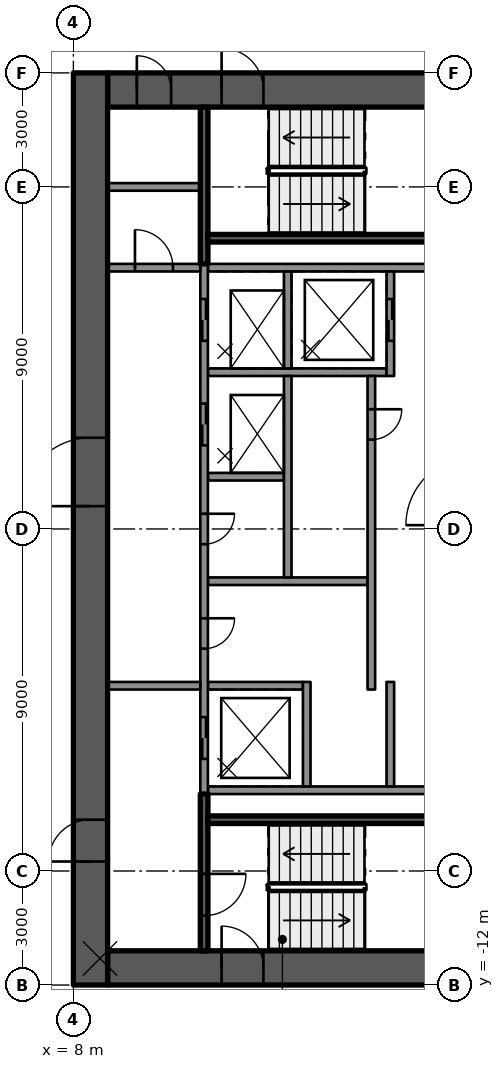
"""IFC4 building model, lengths in metres.
Left out: names, types, materials, properties, quantities, classifications, styles, units other than length and angle.
Written with IfcOpenShell. Run it as: python <this file> out.ifc"""

import sys

from ifc_helpers import new_model, si_unit, direction, frame, frame_2d, origin, place, context, subcontext, project, spatial, rectangle, extrude, element, fill, save


model = new_model("IFC4")
c1 = context("Model", 3, precision=1e-05, world=origin(), true_north=direction((0.0, 1.0)))
c2 = subcontext(c1, "Body", "Model", "MODEL_VIEW")
j1 = project(units=[si_unit("LENGTHUNIT", "METRE"), si_unit("PLANEANGLEUNIT", "RADIAN")], contexts=[c1])
p1 = place(None, origin())
s1 = spatial("IfcSite", under=j1, at=p1, CompositionType="ELEMENT")
p2 = place(p1, origin())
s2 = spatial("IfcBuilding", under=s1, at=p2, CompositionType="ELEMENT")
p3 = place(p2, frame((0.0, 0.0, 246.0)))
s3 = spatial("IfcBuildingStorey", under=s2, at=p3, CompositionType="ELEMENT", Elevation=246.0)
p4 = place(p3, frame((8.9, 11.55, 0.0), z_axis=(0.0, 0.0, 1.0), x_axis=(1.0, 0.0, 0.0)))
e1 = element("IfcWall", 1, at=p4, inside=s3, PredefinedType="SHEAR", context=c2, shape_type="SweptSolid", body=[
    extrude(rectangle(XDim=9.2, YDim=0.9, at=frame_2d((4.6, 0.0))), origin(), (0.0, 0.0, 1.0), 3.5),
])
p5 = place(p4, frame((3.0, 0.0, 0.0)))
e2 = element("IfcOpeningElement", 2, at=p5, cuts=e1, PredefinedType="OPENING", context=c2, shape_type="SweptSolid", body=[
    extrude(rectangle(XDim=1.1, YDim=2.1, at=frame_2d((0.55, 1.05))), frame((0.0, 0.46, 0.0), z_axis=(0.0, -1.0, 0.0), x_axis=(1.0, 0.0, 0.0)), (0.0, 0.0, 1.0), 0.92),
])
p6 = place(p4, frame((0.77, 0.0, 0.0)))
e3 = element("IfcOpeningElement", 3, at=p6, cuts=e1, PredefinedType="OPENING", context=c2, shape_type="SweptSolid", body=[
    extrude(rectangle(XDim=0.9, YDim=2.1, at=frame_2d((0.45, 1.05))), frame((0.0, 0.46, 0.0), z_axis=(0.0, -1.0, 0.0), x_axis=(1.0, 0.0, 0.0)), (0.0, 0.0, 1.0), 0.92),
])
p7 = place(p3, frame((8.9, -11.55, 0.0), z_axis=(0.0, 0.0, 1.0), x_axis=(1.0, 0.0, 0.0)))
e4 = element("IfcWall", 4, at=p7, inside=s3, PredefinedType="SHEAR", context=c2, shape_type="SweptSolid", body=[
    extrude(rectangle(XDim=9.2, YDim=0.9, at=frame_2d((4.6, 0.0))), origin(), (0.0, 0.0, 1.0), 3.5),
])
p8 = place(p7, frame((3.0, 0.0, 0.0)))
e5 = element("IfcOpeningElement", 5, at=p8, cuts=e4, PredefinedType="OPENING", context=c2, shape_type="SweptSolid", body=[
    extrude(rectangle(XDim=1.1, YDim=2.1, at=frame_2d((0.55, 1.05))), frame((0.0, 0.46, 0.0), z_axis=(0.0, -1.0, 0.0), x_axis=(1.0, 0.0, 0.0)), (0.0, 0.0, 1.0), 0.92),
])
p9 = place(p3, frame((8.45, -12.0, 0.0), z_axis=(0.0, 0.0, 1.0), x_axis=(0.0, 1.0, 0.0)))
e6 = element("IfcWall", 6, at=p9, inside=s3, PredefinedType="SHEAR", context=c2, shape_type="SweptSolid", body=[
    extrude(rectangle(XDim=24.0, YDim=0.9, at=frame_2d((12.0, 0.0))), origin(), (0.0, 0.0, 1.0), 3.5),
])
p10 = place(p9, frame((12.6, 0.0, 0.0)))
e7 = element("IfcOpeningElement", 7, at=p10, cuts=e6, PredefinedType="OPENING", context=c2, shape_type="SweptSolid", body=[
    extrude(rectangle(XDim=1.8, YDim=2.1, at=frame_2d((0.9, 1.05))), frame((0.0, 0.46, 0.0), z_axis=(0.0, -1.0, 0.0), x_axis=(1.0, 0.0, 0.0)), (0.0, 0.0, 1.0), 0.92),
])
p11 = place(p9, frame((3.25, 0.0, 0.0)))
e8 = element("IfcOpeningElement", 8, at=p11, cuts=e6, PredefinedType="OPENING", context=c2, shape_type="SweptSolid", body=[
    extrude(rectangle(XDim=1.1, YDim=2.1, at=frame_2d((0.55, 1.05))), frame((0.0, 0.46, 0.0), z_axis=(0.0, -1.0, 0.0), x_axis=(1.0, 0.0, 0.0)), (0.0, 0.0, 1.0), 0.92),
])
for number, where, z_axis, x_axis in (
    (9, (11.54, -6.875, 0.0), (0.0, 0.0, 1.0), (1.0, 0.0, 0.0)),
    (10, (11.54, 6.875, 0.0), (0.0, 0.0, 1.0), (1.0, 0.0, 0.0)),
):
    element("IfcWall", number, at=place(p3, frame(where, z_axis=z_axis, x_axis=x_axis)), inside=s3, PredefinedType="SOLIDWALL", context=c2, shape_type="SweptSolid", body=[
        extrude(rectangle(XDim=6.56, YDim=0.2, at=frame_2d((3.28, 0.0))), origin(), (0.0, 0.0, 1.0), 3.08),
    ])
p12 = place(p3, frame((11.54, 4.125, 0.0), z_axis=(0.0, 0.0, 1.0), x_axis=(1.0, 0.0, 0.0)))
e11 = element("IfcWall", 11, at=p12, inside=s3, PredefinedType="SOLIDWALL", context=c2, shape_type="SweptSolid", body=[
    extrude(rectangle(XDim=4.7, YDim=0.2, at=frame_2d((2.35, 0.0))), origin(), (0.0, 0.0, 1.0), 3.08),
])
p13 = place(p3, frame((11.54, 1.375, 0.0), z_axis=(0.0, 0.0, 1.0), x_axis=(1.0, 0.0, 0.0)))
e12 = element("IfcWall", 12, at=p13, inside=s3, PredefinedType="SOLIDWALL", context=c2, shape_type="SweptSolid", body=[
    extrude(rectangle(XDim=2.0, YDim=0.2, at=frame_2d((1.0, 0.0))), origin(), (0.0, 0.0, 1.0), 3.08),
])
p14 = place(p3, frame((11.54, -1.375, 0.0), z_axis=(0.0, 0.0, 1.0), x_axis=(1.0, 0.0, 0.0)))
e13 = element("IfcWall", 13, at=p14, inside=s3, PredefinedType="SOLIDWALL", context=c2, shape_type="SweptSolid", body=[
    extrude(rectangle(XDim=4.2, YDim=0.2, at=frame_2d((2.1, 0.0))), origin(), (0.0, 0.0, 1.0), 3.08),
])
p15 = place(p3, frame((11.54, -4.125, 0.0), z_axis=(0.0, 0.0, 1.0), x_axis=(1.0, 0.0, 0.0)))
e14 = element("IfcWall", 14, at=p15, inside=s3, PredefinedType="SOLIDWALL", context=c2, shape_type="SweptSolid", body=[
    extrude(rectangle(XDim=2.5, YDim=0.2, at=frame_2d((1.25, 0.0))), origin(), (0.0, 0.0, 1.0), 3.08),
])
p16 = place(p3, frame((11.44, 6.975, 0.0), z_axis=(0.0, 0.0, 1.0), x_axis=(0.0, -1.0, 0.0)))
e15 = element("IfcWall", 15, at=p16, inside=s3, PredefinedType="SOLIDWALL", context=c2, shape_type="SweptSolid", body=[
    extrude(rectangle(XDim=13.95, YDim=0.2, at=frame_2d((6.975, 0.0))), origin(), (0.0, 0.0, 1.0), 3.08),
])
p17 = place(p16, frame((0.925, 0.0, 0.0)))
e16 = element("IfcOpeningElement", 16, at=p17, cuts=e15, PredefinedType="OPENING", context=c2, shape_type="SweptSolid", body=[
    extrude(rectangle(XDim=1.1, YDim=2.1, at=frame_2d((0.55, 1.05))), frame((0.0, 0.11, 0.0), z_axis=(0.0, -1.0, 0.0), x_axis=(1.0, 0.0, 0.0)), (0.0, 0.0, 1.0), 0.22),
])
p18 = place(p16, frame((3.675, 0.0, 0.0)))
e17 = element("IfcOpeningElement", 17, at=p18, cuts=e15, PredefinedType="OPENING", context=c2, shape_type="SweptSolid", body=[
    extrude(rectangle(XDim=1.1, YDim=2.1, at=frame_2d((0.55, 1.05))), frame((0.0, 0.11, 0.0), z_axis=(0.0, -1.0, 0.0), x_axis=(1.0, 0.0, 0.0)), (0.0, 0.0, 1.0), 0.22),
])
p19 = place(p16, frame((11.925, 0.0, 0.0)))
e18 = element("IfcOpeningElement", 18, at=p19, cuts=e15, PredefinedType="OPENING", context=c2, shape_type="SweptSolid", body=[
    extrude(rectangle(XDim=1.1, YDim=2.1, at=frame_2d((0.55, 1.05))), frame((0.0, 0.11, 0.0), z_axis=(0.0, -1.0, 0.0), x_axis=(1.0, 0.0, 0.0)), (0.0, 0.0, 1.0), 0.22),
])
p20 = place(p16, frame((6.575, 0.0, 0.0)))
e19 = element("IfcOpeningElement", 19, at=p20, cuts=e15, PredefinedType="OPENING", context=c2, shape_type="SweptSolid", body=[
    extrude(rectangle(XDim=0.8, YDim=2.1, at=frame_2d((0.4, 1.05))), frame((0.0, 0.11, 0.0), z_axis=(0.0, -1.0, 0.0), x_axis=(1.0, 0.0, 0.0)), (0.0, 0.0, 1.0), 0.22),
])
p21 = place(p16, frame((9.325, 0.0, 0.0)))
e20 = element("IfcOpeningElement", 20, at=p21, cuts=e15, PredefinedType="OPENING", context=c2, shape_type="SweptSolid", body=[
    extrude(rectangle(XDim=0.8, YDim=2.1, at=frame_2d((0.4, 1.05))), frame((0.0, 0.11, 0.0), z_axis=(0.0, -1.0, 0.0), x_axis=(1.0, 0.0, 0.0)), (0.0, 0.0, 1.0), 0.22),
])
p22 = place(p3, frame((13.64, 6.775, 0.0), z_axis=(0.0, 0.0, 1.0), x_axis=(0.0, -1.0, 0.0)))
e21 = element("IfcWall", 21, at=p22, inside=s3, PredefinedType="SOLIDWALL", context=c2, shape_type="SweptSolid", body=[
    extrude(rectangle(XDim=2.55, YDim=0.2, at=frame_2d((1.275, 0.0))), origin(), (0.0, 0.0, 1.0), 3.08),
])
p23 = place(p3, frame((13.64, 4.025, 0.0), z_axis=(0.0, 0.0, 1.0), x_axis=(0.0, -1.0, 0.0)))
e22 = element("IfcWall", 22, at=p23, inside=s3, PredefinedType="SOLIDWALL", context=c2, shape_type="SweptSolid", body=[
    extrude(rectangle(XDim=5.3, YDim=0.2, at=frame_2d((2.65, 0.0))), origin(), (0.0, 0.0, 1.0), 3.08),
])
p24 = place(p3, frame((14.14, -4.025, 0.0), z_axis=(0.0, 0.0, 1.0), x_axis=(0.0, -1.0, 0.0)))
e23 = element("IfcWall", 23, at=p24, inside=s3, PredefinedType="SOLIDWALL", context=c2, shape_type="SweptSolid", body=[
    extrude(rectangle(XDim=2.75, YDim=0.2, at=frame_2d((1.375, 0.0))), origin(), (0.0, 0.0, 1.0), 3.08),
])
p25 = place(p3, frame((16.34, 6.775, 0.0), z_axis=(0.0, 0.0, 1.0), x_axis=(0.0, -1.0, 0.0)))
e24 = element("IfcWall", 24, at=p25, inside=s3, PredefinedType="SOLIDWALL", context=c2, shape_type="SweptSolid", body=[
    extrude(rectangle(XDim=2.75, YDim=0.2, at=frame_2d((1.375, 0.0))), origin(), (0.0, 0.0, 1.0), 3.08),
])
p26 = place(p25, frame((0.725, 0.0, 0.0)))
e25 = element("IfcOpeningElement", 25, at=p26, cuts=e24, PredefinedType="OPENING", context=c2, shape_type="SweptSolid", body=[
    extrude(rectangle(XDim=1.1, YDim=2.1, at=frame_2d((0.55, 1.05))), frame((0.0, 0.11, 0.0), z_axis=(0.0, -1.0, 0.0), x_axis=(1.0, 0.0, 0.0)), (0.0, 0.0, 1.0), 0.22),
])
p27 = place(p3, frame((15.84, 4.025, 0.0), z_axis=(0.0, 0.0, 1.0), x_axis=(0.0, -1.0, 0.0)))
e26 = element("IfcWall", 26, at=p27, inside=s3, PredefinedType="SOLIDWALL", context=c2, shape_type="SweptSolid", body=[
    extrude(rectangle(XDim=8.25, YDim=0.2, at=frame_2d((4.125, 0.0))), origin(), (0.0, 0.0, 1.0), 3.08),
])
p28 = place(p27, frame((0.875, 0.0, 0.0)))
e27 = element("IfcOpeningElement", 27, at=p28, cuts=e26, PredefinedType="OPENING", context=c2, shape_type="SweptSolid", body=[
    extrude(rectangle(XDim=0.8, YDim=2.1, at=frame_2d((0.4, 1.05))), frame((0.0, 0.11, 0.0), z_axis=(0.0, -1.0, 0.0), x_axis=(1.0, 0.0, 0.0)), (0.0, 0.0, 1.0), 0.22),
])
p29 = place(p3, frame((16.34, -4.025, 0.0), z_axis=(0.0, 0.0, 1.0), x_axis=(0.0, -1.0, 0.0)))
e28 = element("IfcWall", 28, at=p29, inside=s3, PredefinedType="SOLIDWALL", context=c2, shape_type="SweptSolid", body=[
    extrude(rectangle(XDim=2.75, YDim=0.2, at=frame_2d((1.375, 0.0))), origin(), (0.0, 0.0, 1.0), 3.08),
])
p30 = place(p3, frame((11.44, -6.975, 0.0), z_axis=(0.0, 0.0, 1.0), x_axis=(0.0, -1.0, 0.0)))
e29 = element("IfcWall", 29, at=p30, inside=s3, PredefinedType="SOLIDWALL", context=c2, shape_type="SweptSolid", body=[
    extrude(rectangle(XDim=4.125, YDim=0.2, at=frame_2d((2.062, 0.0))), origin(), (0.0, 0.0, 1.0), 3.08),
])
p31 = place(p30, frame((2.1, 0.0, 0.0)))
e30 = element("IfcOpeningElement", 30, at=p31, cuts=e29, PredefinedType="OPENING", context=c2, shape_type="SweptSolid", body=[
    extrude(rectangle(XDim=1.1, YDim=2.1, at=frame_2d((0.55, 1.05))), frame((0.0, 0.11, 0.0), z_axis=(0.0, -1.0, 0.0), x_axis=(1.0, 0.0, 0.0)), (0.0, 0.0, 1.0), 0.22),
])
p32 = place(p3, frame((11.54, -7.65, 0.0), z_axis=(0.0, 0.0, 1.0), x_axis=(1.0, 0.0, 0.0)))
e31 = element("IfcWall", 31, at=p32, inside=s3, PredefinedType="SOLIDWALL", context=c2, shape_type="SweptSolid", body=[
    extrude(rectangle(XDim=6.56, YDim=0.2, at=frame_2d((3.28, 0.0))), origin(), (0.0, 0.0, 1.0), 3.08),
])
p33 = place(p3, frame((11.44, 11.1, 0.0), z_axis=(0.0, 0.0, 1.0), x_axis=(0.0, -1.0, 0.0)))
e32 = element("IfcWall", 32, at=p33, inside=s3, PredefinedType="SOLIDWALL", context=c2, shape_type="SweptSolid", body=[
    extrude(rectangle(XDim=4.125, YDim=0.2, at=frame_2d((2.062, 0.0))), origin(), (0.0, 0.0, 1.0), 3.08),
])
p34 = place(p3, frame((11.54, 7.65, 0.0), z_axis=(0.0, 0.0, 1.0), x_axis=(1.0, 0.0, 0.0)))
e33 = element("IfcWall", 33, at=p34, inside=s3, PredefinedType="SOLIDWALL", context=c2, shape_type="SweptSolid", body=[
    extrude(rectangle(XDim=6.56, YDim=0.2, at=frame_2d((3.28, 0.0))), origin(), (0.0, 0.0, 1.0), 3.08),
])
p35 = place(p3, frame((8.9, -4.125, 0.0), z_axis=(0.0, 0.0, 1.0), x_axis=(1.0, 0.0, 0.0)))
e34 = element("IfcWall", 34, at=p35, inside=s3, PredefinedType="PARTITIONING", context=c2, shape_type="SweptSolid", body=[
    extrude(rectangle(XDim=2.44, YDim=0.2, at=frame_2d((1.22, 0.0))), origin(), (0.0, 0.0, 1.0), 3.08),
])
p36 = place(p3, frame((8.9, 6.875, 0.0), z_axis=(0.0, 0.0, 1.0), x_axis=(1.0, 0.0, 0.0)))
e35 = element("IfcWall", 35, at=p36, inside=s3, PredefinedType="PARTITIONING", context=c2, shape_type="SweptSolid", body=[
    extrude(rectangle(XDim=2.44, YDim=0.2, at=frame_2d((1.22, 0.0))), origin(), (0.0, 0.0, 1.0), 3.08),
])
p37 = place(p36, frame((0.72, 0.0, 0.0)))
e36 = element("IfcOpeningElement", 36, at=p37, cuts=e35, PredefinedType="OPENING", context=c2, shape_type="SweptSolid", body=[
    extrude(rectangle(XDim=1.0, YDim=2.1, at=frame_2d((0.5, 1.05))), frame((0.0, 0.11, 0.0), z_axis=(0.0, -1.0, 0.0), x_axis=(1.0, 0.0, 0.0)), (0.0, 0.0, 1.0), 0.22),
])
p38 = place(p3, frame((8.9, 9.0, 0.0), z_axis=(0.0, 0.0, 1.0), x_axis=(1.0, 0.0, 0.0)))
e37 = element("IfcWall", 37, at=p38, inside=s3, PredefinedType="PARTITIONING", context=c2, shape_type="SweptSolid", body=[
    extrude(rectangle(XDim=2.44, YDim=0.2, at=frame_2d((1.22, 0.0))), origin(), (0.0, 0.0, 1.0), 3.08),
])
p39 = place(p17, origin())
e38 = element("IfcDoor", 38, at=p39, inside=s3, OperationType="DOUBLE_DOOR_SLIDING", PredefinedType="DOOR", context=c2, shape_type="SweptSolid", body=[
    extrude(rectangle(XDim=1.1, YDim=2.1, at=frame_2d((0.55, 1.05))), frame((0.0, 0.025, 0.0), z_axis=(0.0, -1.0, 0.0), x_axis=(1.0, 0.0, 0.0)), (0.0, 0.0, 1.0), 0.05),
])
fill(e16, e38)
p40 = place(p26, origin())
e39 = element("IfcDoor", 39, at=p40, inside=s3, OperationType="DOUBLE_DOOR_SLIDING", PredefinedType="DOOR", context=c2, shape_type="SweptSolid", body=[
    extrude(rectangle(XDim=1.1, YDim=2.1, at=frame_2d((0.55, 1.05))), frame((0.0, 0.025, 0.0), z_axis=(0.0, -1.0, 0.0), x_axis=(1.0, 0.0, 0.0)), (0.0, 0.0, 1.0), 0.05),
])
fill(e25, e39)
p41 = place(p18, origin())
e40 = element("IfcDoor", 40, at=p41, inside=s3, OperationType="DOUBLE_DOOR_SLIDING", PredefinedType="DOOR", context=c2, shape_type="SweptSolid", body=[
    extrude(rectangle(XDim=1.1, YDim=2.1, at=frame_2d((0.55, 1.05))), frame((0.0, 0.025, 0.0), z_axis=(0.0, -1.0, 0.0), x_axis=(1.0, 0.0, 0.0)), (0.0, 0.0, 1.0), 0.05),
])
fill(e17, e40)
p42 = place(p19, origin())
e41 = element("IfcDoor", 41, at=p42, inside=s3, OperationType="DOUBLE_DOOR_SLIDING", PredefinedType="DOOR", context=c2, shape_type="SweptSolid", body=[
    extrude(rectangle(XDim=1.1, YDim=2.1, at=frame_2d((0.55, 1.05))), frame((0.0, 0.025, 0.0), z_axis=(0.0, -1.0, 0.0), x_axis=(1.0, 0.0, 0.0)), (0.0, 0.0, 1.0), 0.05),
])
fill(e18, e41)
p43 = place(p28, origin())
e42 = element("IfcDoor", 42, at=p43, inside=s3, OperationType="SINGLE_SWING_LEFT", PredefinedType="DOOR", context=c2, shape_type="SweptSolid", body=[
    extrude(rectangle(XDim=0.8, YDim=2.1, at=frame_2d((0.4, 1.05))), frame((0.0, 0.025, 0.0), z_axis=(0.0, -1.0, 0.0), x_axis=(1.0, 0.0, 0.0)), (0.0, 0.0, 1.0), 0.05),
])
fill(e27, e42)
p44 = place(p20, origin())
e43 = element("IfcDoor", 43, at=p44, inside=s3, OperationType="SINGLE_SWING_LEFT", PredefinedType="DOOR", context=c2, shape_type="SweptSolid", body=[
    extrude(rectangle(XDim=0.8, YDim=2.1, at=frame_2d((0.4, 1.05))), frame((0.0, 0.025, 0.0), z_axis=(0.0, -1.0, 0.0), x_axis=(1.0, 0.0, 0.0)), (0.0, 0.0, 1.0), 0.05),
])
fill(e19, e43)
p45 = place(p21, origin())
e44 = element("IfcDoor", 44, at=p45, inside=s3, OperationType="SINGLE_SWING_LEFT", PredefinedType="DOOR", context=c2, shape_type="SweptSolid", body=[
    extrude(rectangle(XDim=0.8, YDim=2.1, at=frame_2d((0.4, 1.05))), frame((0.0, 0.025, 0.0), z_axis=(0.0, -1.0, 0.0), x_axis=(1.0, 0.0, 0.0)), (0.0, 0.0, 1.0), 0.05),
])
fill(e20, e44)
p46 = place(p10, origin())
e45 = element("IfcDoor", 45, at=p46, inside=s3, OperationType="SINGLE_SWING_RIGHT", PredefinedType="DOOR", context=c2, shape_type="SweptSolid", body=[
    extrude(rectangle(XDim=1.8, YDim=2.1, at=frame_2d((0.9, 1.05))), frame((0.0, 0.025, 0.0), z_axis=(0.0, -1.0, 0.0), x_axis=(1.0, 0.0, 0.0)), (0.0, 0.0, 1.0), 0.05),
])
fill(e7, e45)
p47 = place(p11, origin())
e46 = element("IfcDoor", 46, at=p47, inside=s3, OperationType="SINGLE_SWING_LEFT", PredefinedType="DOOR", context=c2, shape_type="SweptSolid", body=[
    extrude(rectangle(XDim=1.1, YDim=2.1, at=frame_2d((0.55, 1.05))), frame((0.0, 0.025, 0.0), z_axis=(0.0, -1.0, 0.0), x_axis=(1.0, 0.0, 0.0)), (0.0, 0.0, 1.0), 0.05),
])
fill(e8, e46)
p48 = place(p8, origin())
e47 = element("IfcDoor", 47, at=p48, inside=s3, OperationType="SINGLE_SWING_LEFT", PredefinedType="DOOR", context=c2, shape_type="SweptSolid", body=[
    extrude(rectangle(XDim=1.1, YDim=2.1, at=frame_2d((0.55, 1.05))), frame((0.0, 0.025, 0.0), z_axis=(0.0, -1.0, 0.0), x_axis=(1.0, 0.0, 0.0)), (0.0, 0.0, 1.0), 0.05),
])
fill(e5, e47)
p49 = place(p5, origin())
e48 = element("IfcDoor", 48, at=p49, inside=s3, OperationType="SINGLE_SWING_LEFT", PredefinedType="DOOR", context=c2, shape_type="SweptSolid", body=[
    extrude(rectangle(XDim=1.1, YDim=2.1, at=frame_2d((0.55, 1.05))), frame((0.0, 0.025, 0.0), z_axis=(0.0, -1.0, 0.0), x_axis=(1.0, 0.0, 0.0)), (0.0, 0.0, 1.0), 0.05),
])
fill(e2, e48)
p50 = place(p31, origin())
e49 = element("IfcDoor", 49, at=p50, inside=s3, OperationType="SINGLE_SWING_RIGHT", PredefinedType="DOOR", context=c2, shape_type="SweptSolid", body=[
    extrude(rectangle(XDim=1.1, YDim=2.1, at=frame_2d((0.55, 1.05))), frame((0.0, 0.025, 0.0), z_axis=(0.0, -1.0, 0.0), x_axis=(1.0, 0.0, 0.0)), (0.0, 0.0, 1.0), 0.05),
])
fill(e30, e49)
p51 = place(p6, origin())
e50 = element("IfcDoor", 50, at=p51, inside=s3, OperationType="SINGLE_SWING_LEFT", PredefinedType="DOOR", context=c2, shape_type="SweptSolid", body=[
    extrude(rectangle(XDim=0.9, YDim=2.1, at=frame_2d((0.45, 1.05))), frame((0.0, 0.025, 0.0), z_axis=(0.0, -1.0, 0.0), x_axis=(1.0, 0.0, 0.0)), (0.0, 0.0, 1.0), 0.05),
])
fill(e3, e50)
p52 = place(p37, origin())
e51 = element("IfcDoor", 51, at=p52, inside=s3, OperationType="SINGLE_SWING_RIGHT", PredefinedType="DOOR", context=c2, shape_type="SweptSolid", body=[
    extrude(rectangle(XDim=1.0, YDim=2.1, at=frame_2d((0.5, 1.05))), frame((0.0, 0.025, 0.0), z_axis=(0.0, -1.0, 0.0), x_axis=(1.0, 0.0, 0.0)), (0.0, 0.0, 1.0), 0.05),
])
fill(e36, e51)
save(model, sys.argv[1])
